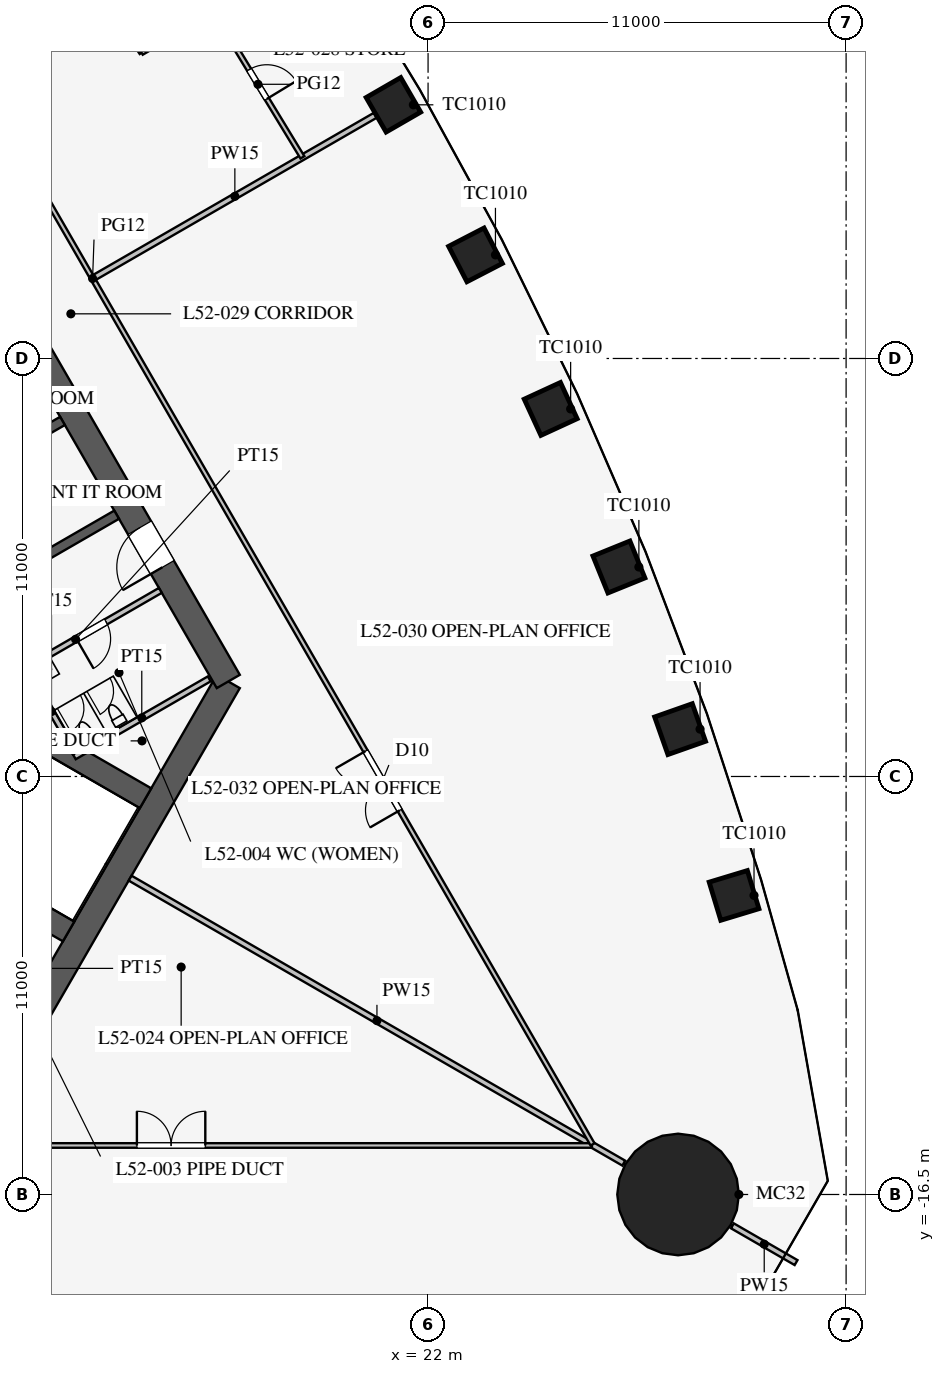
"""IFC4 building model, lengths in metres.
Left out: names, types, materials, properties, quantities, classifications, styles, units other than length and angle.
Written with IfcOpenShell. Run it as: python <this file> out.ifc"""

import sys

from ifc_helpers import new_model, si_unit, direction, frame, frame_2d, origin, origin_2d, place, context, subcontext, project, spatial, rectangle, circle, extrude, element, fill, save


model = new_model("IFC4")
c1 = context("Model", 3, precision=1e-05, world=origin(), true_north=direction((0.0, 1.0)))
c2 = subcontext(c1, "Body", "Model", "MODEL_VIEW")
j1 = project(units=[si_unit("LENGTHUNIT", "METRE"), si_unit("PLANEANGLEUNIT", "RADIAN")], contexts=[c1])
p1 = place(None, origin())
s1 = spatial("IfcSite", under=j1, at=p1, CompositionType="ELEMENT")
p2 = place(p1, origin())
s2 = spatial("IfcBuilding", under=s1, at=p2, CompositionType="ELEMENT")
p3 = place(p2, frame((0.0, 0.0, 227.5)))
s3 = spatial("IfcBuildingStorey", under=s2, at=p3, CompositionType="ELEMENT", Elevation=227.5)
for number, where, z_axis, x_axis in (
    (1, (30.052, -8.63, 0.0), (0.0, 0.0, 1.0), (-0.29, 0.957, 0.0)),
    (2, (28.632, -4.254, 0.0), (0.0, 0.0, 1.0), (-0.332, 0.943, 0.0)),
    (3, (27.022, 0.013, 0.0), (0.0, 0.0, 1.0), (-0.376, 0.927, 0.0)),
    (4, (25.227, 4.172, 0.0), (0.0, 0.0, 1.0), (-0.418, 0.908, 0.0)),
    (5, (23.248, 8.226, 0.0), (0.0, 0.0, 1.0), (-0.46, 0.888, 0.0)),
    (6, (21.088, 12.175, 0.0), (0.0, 0.0, 1.0), (-0.5, 0.866, 0.0)),
):
    element("IfcColumn", number, at=place(p3, frame(where, z_axis=z_axis, x_axis=x_axis)), inside=s3, PredefinedType="COLUMN", context=c2, shape_type="SweptSolid", body=[
        extrude(rectangle(XDim=1.05, YDim=1.05, at=origin_2d()), origin(), (0.0, 0.0, 1.0), 4.2),
    ])
p4 = place(p3, frame((28.579, -16.5, 0.0), z_axis=(0.0, 0.0, 1.0), x_axis=(1.0, 0.0, 0.0)))
e7 = element("IfcColumn", 7, at=p4, inside=s3, PredefinedType="COLUMN", context=c2, shape_type="SweptSolid", body=[
    extrude(circle(Radius=1.6, at=origin_2d()), origin(), (0.0, 0.0, 1.0), 4.2),
])
p5 = place(p3, frame((10.97, -13.0, 0.0), z_axis=(0.0, 0.0, 1.0), x_axis=(0.499995765644, 0.866027848477, 0.0)))
e8 = element("IfcWall", 8, at=p5, inside=s3, PredefinedType="SHEAR", context=c2, shape_type="SweptSolid", body=[
    extrude(rectangle(XDim=11.547, YDim=0.7, at=frame_2d((5.773, 0.0))), origin(), (0.0, 0.0, 1.0), 4.2),
])
p6 = place(p3, frame((16.743, -3.0, 0.0), z_axis=(0.0, 0.0, 1.0), x_axis=(-0.500002442456, 0.866023993627, 0.0)))
e9 = element("IfcWall", 9, at=p6, inside=s3, PredefinedType="SHEAR", context=c2, shape_type="SweptSolid", body=[
    extrude(rectangle(XDim=21.939, YDim=0.7, at=frame_2d((10.97, 0.0))), origin(), (0.0, 0.0, 1.0), 4.2),
])
p7 = place(p6, frame((17.27, 0.0, 0.0)))
e10 = element("IfcOpeningElement", 10, at=p7, cuts=e9, PredefinedType="OPENING", context=c2, shape_type="SweptSolid", body=[
    extrude(rectangle(XDim=1.2, YDim=2.1, at=frame_2d((0.6, 1.05))), frame((0.0, 0.36, 0.0), z_axis=(0.0, -1.0, 0.0), x_axis=(1.0, 0.0, 0.0)), (0.0, 0.0, 1.0), 0.72),
])
p8 = place(p6, frame((3.47, 0.0, 0.0)))
e11 = element("IfcOpeningElement", 11, at=p8, cuts=e9, PredefinedType="OPENING", context=c2, shape_type="SweptSolid", body=[
    extrude(rectangle(XDim=1.2, YDim=2.1, at=frame_2d((0.6, 1.05))), frame((0.0, 0.36, 0.0), z_axis=(0.0, -1.0, 0.0), x_axis=(1.0, 0.0, 0.0)), (0.0, 0.0, 1.0), 0.72),
])
for number, where, z_axis, x_axis in (
    (12, (11.532, 0.076, 0.0), (0.0, 0.0, 1.0), (0.866, 0.5, 0.0)),
    (13, (10.107, 2.544, 0.0), (0.0, 0.0, 1.0), (0.866, 0.5, 0.0)),
):
    element("IfcWall", number, at=place(p3, frame(where, z_axis=z_axis, x_axis=x_axis)), inside=s3, PredefinedType="SHEAR", context=c2, shape_type="SweptSolid", body=[
        extrude(rectangle(XDim=2.625, YDim=0.25, at=frame_2d((1.312, 0.0))), origin(), (0.0, 0.0, 1.0), 4.2),
    ])
for number, where, z_axis, x_axis in (
    (14, (4.638, -5.016, 0.0), (0.0, 0.0, 1.0), (0.866, -0.5, 0.0)),
    (15, (6.663, -1.509, 0.0), (0.0, 0.0, 1.0), (0.866, -0.5, 0.0)),
):
    element("IfcWall", number, at=place(p3, frame(where, z_axis=z_axis, x_axis=x_axis)), inside=s3, PredefinedType="SHEAR", context=c2, shape_type="SweptSolid", body=[
        extrude(rectangle(XDim=9.125, YDim=0.6, at=frame_2d((4.562, 0.0))), origin(), (0.0, 0.0, 1.0), 4.2),
    ])
p9 = place(p3, frame((10.495, -3.178, 0.0), z_axis=(0.0, 0.0, 1.0), x_axis=(0.866037967349, 0.499978238636, 0.0)))
e16 = element("IfcWall", 16, at=p9, inside=s3, PredefinedType="PARTITIONING", context=c2, shape_type="SweptSolid", body=[
    extrude(rectangle(XDim=5.15, YDim=0.15, at=frame_2d((2.575, 0.0))), origin(), (0.0, 0.0, 1.0), 4.0),
])
p10 = place(p9, frame((2.6, 0.0, 0.0)))
e17 = element("IfcOpeningElement", 17, at=p10, cuts=e16, PredefinedType="OPENING", context=c2, shape_type="SweptSolid", body=[
    extrude(rectangle(XDim=0.9, YDim=2.1, at=frame_2d((0.45, 1.05))), frame((0.0, 0.085, 0.0), z_axis=(0.0, -1.0, 0.0), x_axis=(1.0, 0.0, 0.0)), (0.0, 0.0, 1.0), 0.17),
])
p11 = place(p3, frame((12.691, -4.982, 0.0), z_axis=(0.0, 0.0, 1.0), x_axis=(0.8660249478, 0.500000789788, 0.0)))
e18 = element("IfcWall", 18, at=p11, inside=s3, PredefinedType="PARTITIONING", context=c2, shape_type="SweptSolid", body=[
    extrude(rectangle(XDim=4.1, YDim=0.15, at=frame_2d((2.05, 0.0))), origin(), (0.0, 0.0, 1.0), 4.0),
])
p12 = place(p3, frame((11.464, -2.706, 0.0), z_axis=(0.0, 0.0, 1.0), x_axis=(0.50001992892, -0.866013897511, 0.0)))
e19 = element("IfcWall", 19, at=p12, inside=s3, PredefinedType="PARTITIONING", context=c2, shape_type="SweptSolid", body=[
    extrude(rectangle(XDim=2.51, YDim=0.15, at=frame_2d((1.255, 0.0))), origin(), (0.0, 0.0, 1.0), 4.0),
])
p13 = place(p3, frame((14.159, -8.175, 0.0), z_axis=(0.0, 0.0, 1.0), x_axis=(0.866027028085, -0.499997186618, 0.0)))
e20 = element("IfcWall", 20, at=p13, inside=s3, PredefinedType="PARTITIONING", context=c2, shape_type="SweptSolid", body=[
    extrude(rectangle(XDim=15.0, YDim=0.15, at=frame_2d((7.5, 0.0))), origin(), (0.0, 0.0, 1.0), 2.4),
])
p14 = place(p3, frame((30.008, -17.325, 0.0), z_axis=(0.0, 0.0, 1.0), x_axis=(0.866013246922, -0.500021055713, 0.0)))
e21 = element("IfcWall", 21, at=p14, inside=s3, PredefinedType="PARTITIONING", context=c2, shape_type="SweptSolid", body=[
    extrude(rectangle(XDim=1.935, YDim=0.15, at=frame_2d((0.967, 0.0))), origin(), (0.0, 0.0, 1.0), 2.4),
])
p15 = place(p3, frame((-26.312, -15.21, 0.0), z_axis=(0.0, 0.0, 1.0), x_axis=(1.0, 0.0, 0.0)))
e22 = element("IfcWall", 22, at=p15, inside=s3, PredefinedType="PARTITIONING", context=c2, shape_type="SweptSolid", body=[
    extrude(rectangle(XDim=52.624, YDim=0.12, at=frame_2d((26.312, 0.0))), origin(), (0.0, 0.0, 1.0), 2.9),
])
p16 = place(p15, frame((10.15, 0.0, 0.15)))
e23 = element("IfcOpeningElement", 23, at=p16, cuts=e22, PredefinedType="OPENING", context=c2, shape_type="SweptSolid", body=[
    extrude(rectangle(XDim=1.8, YDim=2.1, at=frame_2d((0.9, 1.05))), frame((0.0, 0.07, 0.0), z_axis=(0.0, -1.0, 0.0), x_axis=(1.0, 0.0, 0.0)), (0.0, 0.0, 1.0), 0.14),
])
p17 = place(p15, frame((40.65, 0.0, 0.15)))
e24 = element("IfcOpeningElement", 24, at=p17, cuts=e22, PredefinedType="OPENING", context=c2, shape_type="SweptSolid", body=[
    extrude(rectangle(XDim=1.8, YDim=2.1, at=frame_2d((0.9, 1.05))), frame((0.0, 0.07, 0.0), z_axis=(0.0, -1.0, 0.0), x_axis=(1.0, 0.0, 0.0)), (0.0, 0.0, 1.0), 0.14),
])
p18 = place(p3, frame((13.224, 7.635, 0.0), z_axis=(0.0, 0.0, 1.0), x_axis=(0.866035375346, 0.499982728352, 0.0)))
e25 = element("IfcWall", 25, at=p18, inside=s3, PredefinedType="PARTITIONING", context=c2, shape_type="SweptSolid", body=[
    extrude(rectangle(XDim=8.526, YDim=0.15, at=frame_2d((4.263, 0.0))), origin(), (0.0, 0.0, 1.0), 3.3),
])
p19 = place(p3, frame((26.328, -15.182, 0.0), z_axis=(0.0, 0.0, 1.0), x_axis=(-0.500000626146, 0.866025042278, 0.0)))
e26 = element("IfcWall", 26, at=p19, inside=s3, PredefinedType="PARTITIONING", context=c2, shape_type="SweptSolid", body=[
    extrude(rectangle(XDim=52.624, YDim=0.12, at=frame_2d((26.312, 0.0))), origin(), (0.0, 0.0, 1.0), 2.9),
])
p20 = place(p19, frame((10.15, 0.0, 0.15)))
e27 = element("IfcOpeningElement", 27, at=p20, cuts=e26, PredefinedType="OPENING", context=c2, shape_type="SweptSolid", body=[
    extrude(rectangle(XDim=1.8, YDim=2.1, at=frame_2d((0.9, 1.05))), frame((0.0, 0.07, 0.0), z_axis=(0.0, -1.0, 0.0), x_axis=(1.0, 0.0, 0.0)), (0.0, 0.0, 1.0), 0.14),
])
p21 = place(p19, frame((40.65, 0.0, 0.15)))
e28 = element("IfcOpeningElement", 28, at=p21, cuts=e26, PredefinedType="OPENING", context=c2, shape_type="SweptSolid", body=[
    extrude(rectangle(XDim=1.8, YDim=2.1, at=frame_2d((0.9, 1.05))), frame((0.0, 0.07, 0.0), z_axis=(0.0, -1.0, 0.0), x_axis=(1.0, 0.0, 0.0)), (0.0, 0.0, 1.0), 0.14),
])
p22 = place(p3, frame((18.694, 10.793, 0.0), z_axis=(0.0, 0.0, 1.0), x_axis=(-0.519726678229, 0.854332593278, 0.0)))
e29 = element("IfcWall", 29, at=p22, inside=s3, PredefinedType="PARTITIONING", context=c2, shape_type="SweptSolid", body=[
    extrude(rectangle(XDim=4.501, YDim=0.12, at=frame_2d((2.25, 0.0))), origin(), (0.0, 0.0, 1.0), 2.9),
])
p23 = place(p22, frame((1.8, 0.0, 0.15)))
e30 = element("IfcOpeningElement", 30, at=p23, cuts=e29, PredefinedType="OPENING", context=c2, shape_type="SweptSolid", body=[
    extrude(rectangle(XDim=0.9, YDim=2.1, at=frame_2d((0.45, 1.05))), frame((0.0, 0.07, 0.0), z_axis=(0.0, -1.0, 0.0), x_axis=(1.0, 0.0, 0.0)), (0.0, 0.0, 1.0), 0.14),
])
p24 = place(p3, frame((14.462, 13.546, 0.0), z_axis=(0.0, 0.0, 1.0), x_axis=(-0.55850386778, 0.829501916619, 0.0)))
e31 = element("IfcWall", 31, at=p24, inside=s3, PredefinedType="PARTITIONING", context=c2, shape_type="SweptSolid", body=[
    extrude(rectangle(XDim=4.511, YDim=0.12, at=frame_2d((2.255, 0.0))), origin(), (0.0, 0.0, 1.0), 2.9),
])
p25 = place(p24, frame((1.75, 0.0, 0.15)))
e32 = element("IfcOpeningElement", 32, at=p25, cuts=e31, PredefinedType="OPENING", context=c2, shape_type="SweptSolid", body=[
    extrude(rectangle(XDim=1.0, YDim=2.1, at=frame_2d((0.5, 1.05))), frame((0.0, 0.07, 0.0), z_axis=(0.0, -1.0, 0.0), x_axis=(1.0, 0.0, 0.0)), (0.0, 0.0, 1.0), 0.14),
])
p26 = place(p3, frame((14.462, 13.546, 0.0), z_axis=(0.0, 0.0, 1.0), x_axis=(0.866025498715, 0.499999835575, 0.0)))
e33 = element("IfcWall", 33, at=p26, inside=s3, PredefinedType="PARTITIONING", context=c2, shape_type="SweptSolid", body=[
    extrude(rectangle(XDim=4.394, YDim=0.12, at=frame_2d((2.197, 0.0))), origin(), (0.0, 0.0, 1.0), 2.9),
])
p27 = place(p10, frame((0.9, 0.0, 0.0), z_axis=(0.0, 0.0, 1.0), x_axis=(-1.0, 0.0, 0.0)))
e34 = element("IfcDoor", 34, at=p27, inside=s3, OperationType="SINGLE_SWING_RIGHT", PredefinedType="DOOR", context=c2, shape_type="SweptSolid", body=[
    extrude(rectangle(XDim=0.9, YDim=2.1, at=frame_2d((0.45, 1.05))), frame((0.0, 0.025, 0.0), z_axis=(0.0, -1.0, 0.0), x_axis=(1.0, 0.0, 0.0)), (0.0, 0.0, 1.0), 0.05),
])
fill(e17, e34)
p28 = place(p8, origin())
e35 = element("IfcDoor", 35, at=p28, inside=s3, OperationType="SINGLE_SWING_LEFT", PredefinedType="DOOR", context=c2, shape_type="SweptSolid", body=[
    extrude(rectangle(XDim=1.2, YDim=2.1, at=frame_2d((0.6, 1.05))), frame((0.0, 0.025, 0.0), z_axis=(0.0, -1.0, 0.0), x_axis=(1.0, 0.0, 0.0)), (0.0, 0.0, 1.0), 0.05),
])
fill(e11, e35)
p29 = place(p17, origin())
e36 = element("IfcDoor", 36, at=p29, inside=s3, OperationType="DOUBLE_DOOR_SINGLE_SWING", PredefinedType="DOOR", context=c2, shape_type="SweptSolid", body=[
    extrude(rectangle(XDim=1.8, YDim=2.1, at=frame_2d((0.9, 1.05))), frame((0.0, 0.025, 0.0), z_axis=(0.0, -1.0, 0.0), x_axis=(1.0, 0.0, 0.0)), (0.0, 0.0, 1.0), 0.05),
])
fill(e24, e36)
p30 = place(p23, frame((0.9, 0.0, 0.0), z_axis=(0.0, 0.0, 1.0), x_axis=(-1.0, 0.0, 0.0)))
e37 = element("IfcDoor", 37, at=p30, inside=s3, OperationType="SINGLE_SWING_RIGHT", PredefinedType="DOOR", context=c2, shape_type="SweptSolid", body=[
    extrude(rectangle(XDim=0.9, YDim=2.1, at=frame_2d((0.45, 1.05))), frame((0.0, 0.025, 0.0), z_axis=(0.0, -1.0, 0.0), x_axis=(1.0, 0.0, 0.0)), (0.0, 0.0, 1.0), 0.05),
])
fill(e30, e37)
p31 = place(p20, origin())
e38 = element("IfcDoor", 38, at=p31, inside=s3, OperationType="DOUBLE_DOOR_SINGLE_SWING", PredefinedType="DOOR", context=c2, shape_type="SweptSolid", body=[
    extrude(rectangle(XDim=1.8, YDim=2.1, at=frame_2d((0.9, 1.05))), frame((0.0, 0.025, 0.0), z_axis=(0.0, -1.0, 0.0), x_axis=(1.0, 0.0, 0.0)), (0.0, 0.0, 1.0), 0.05),
])
fill(e27, e38)
save(model, sys.argv[1])
